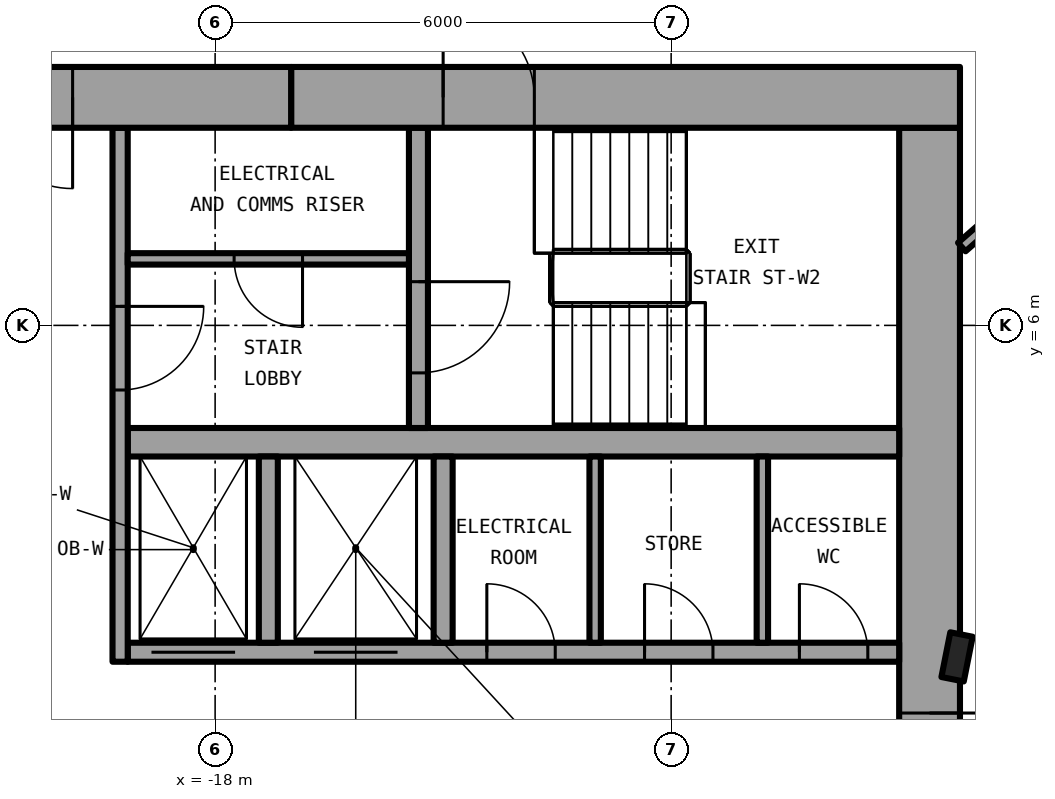
"""IFC4 building model, lengths in metres.
Left out: names, types, materials, properties, quantities, classifications, styles, units other than length and angle.
Written with IfcOpenShell. Run it as: python <this file> out.ifc"""

import sys

from ifc_helpers import new_model, si_unit, direction, frame, frame_2d, origin, origin_2d, place, context, subcontext, project, spatial, rectangle, i_section, extrude, element, fill, save


model = new_model("IFC4")
c1 = context("Model", 3, precision=1e-05, world=origin(), true_north=direction((0.0, 1.0)))
c2 = subcontext(c1, "Body", "Model", "MODEL_VIEW")
j1 = project(units=[si_unit("LENGTHUNIT", "METRE"), si_unit("PLANEANGLEUNIT", "RADIAN")], contexts=[c1])
p1 = place(None, origin())
s1 = spatial("IfcSite", under=j1, at=p1, CompositionType="ELEMENT")
p2 = place(p1, origin())
s2 = spatial("IfcBuilding", under=s1, at=p2, CompositionType="ELEMENT")
p3 = place(p2, origin())
s3 = spatial("IfcBuildingStorey", under=s2, at=p3, CompositionType="ELEMENT", Elevation=0.0)
p4 = place(p3, frame((-8.239, 1.639, -0.5), z_axis=(0.0, 0.0, 1.0), x_axis=(-0.980785280403, 0.195090322016, 0.0)))
e1 = element("IfcColumn", 1, at=p4, inside=s3, PredefinedType="COLUMN", context=c2, shape_type="SweptSolid", body=[
    extrude(i_section(OverallWidth=0.3, OverallDepth=0.6, WebThickness=0.015, FlangeThickness=0.03, FilletRadius=0.027, at=origin_2d()), origin(), (0.0, 0.0, 1.0), 5.9),
])
p5 = place(p3, frame((-8.6, 8.6, 0.0), z_axis=(0.0, 0.0, 1.0), x_axis=(0.0, -1.0, 0.0)))
e2 = element("IfcWall", 2, at=p5, inside=s3, PredefinedType="SHEAR", context=c2, shape_type="SweptSolid", body=[
    extrude(rectangle(XDim=17.2, YDim=0.8, at=frame_2d((8.6, 0.0))), origin(), (0.0, 0.0, 1.0), 5.4),
])
p6 = place(p5, frame((7.7, 0.0, 0.0)))
e3 = element("IfcOpeningElement", 3, at=p6, cuts=e2, PredefinedType="OPENING", context=c2, shape_type="SweptSolid", body=[
    extrude(rectangle(XDim=1.8, YDim=2.3, at=frame_2d((0.9, 1.15))), frame((0.0, 0.41, 0.0), z_axis=(0.0, -1.0, 0.0), x_axis=(1.0, 0.0, 0.0)), (0.0, 0.0, 1.0), 0.82),
])
p7 = place(p3, frame((-19.15, 1.7, 0.0), z_axis=(0.0, 0.0, 1.0), x_axis=(1.0, 0.0, 0.0)))
e4 = element("IfcWall", 4, at=p7, inside=s3, PredefinedType="SHEAR", context=c2, shape_type="SweptSolid", body=[
    extrude(rectangle(XDim=10.15, YDim=0.25, at=frame_2d((5.075, 0.0))), origin(), (0.0, 0.0, 1.0), 5.4),
])
p8 = place(p7, frame((2.45, 0.0, 0.0)))
e5 = element("IfcOpeningElement", 5, at=p8, cuts=e4, PredefinedType="OPENING", context=c2, shape_type="SweptSolid", body=[
    extrude(rectangle(XDim=1.1, YDim=2.3, at=frame_2d((0.55, 1.15))), frame((0.0, 0.135, 0.0), z_axis=(0.0, -1.0, 0.0), x_axis=(1.0, 0.0, 0.0)), (0.0, 0.0, 1.0), 0.27),
])
p9 = place(p7, frame((0.312, 0.0, 0.0)))
e6 = element("IfcOpeningElement", 6, at=p9, cuts=e4, PredefinedType="OPENING", context=c2, shape_type="SweptSolid", body=[
    extrude(rectangle(XDim=1.1, YDim=2.3, at=frame_2d((0.55, 1.15))), frame((0.0, 0.135, 0.0), z_axis=(0.0, -1.0, 0.0), x_axis=(1.0, 0.0, 0.0)), (0.0, 0.0, 1.0), 0.27),
])
p10 = place(p7, frame((8.837, 0.0, 0.0)))
e7 = element("IfcOpeningElement", 7, at=p10, cuts=e4, PredefinedType="OPENING", context=c2, shape_type="SweptSolid", body=[
    extrude(rectangle(XDim=0.9, YDim=2.3, at=frame_2d((0.45, 1.15))), frame((0.0, 0.135, 0.0), z_axis=(0.0, -1.0, 0.0), x_axis=(1.0, 0.0, 0.0)), (0.0, 0.0, 1.0), 0.27),
])
p11 = place(p7, frame((6.8, 0.0, 0.0)))
e8 = element("IfcOpeningElement", 8, at=p11, cuts=e4, PredefinedType="OPENING", context=c2, shape_type="SweptSolid", body=[
    extrude(rectangle(XDim=0.9, YDim=2.3, at=frame_2d((0.45, 1.15))), frame((0.0, 0.135, 0.0), z_axis=(0.0, -1.0, 0.0), x_axis=(1.0, 0.0, 0.0)), (0.0, 0.0, 1.0), 0.27),
])
p12 = place(p7, frame((4.725, 0.0, 0.0)))
e9 = element("IfcOpeningElement", 9, at=p12, cuts=e4, PredefinedType="OPENING", context=c2, shape_type="SweptSolid", body=[
    extrude(rectangle(XDim=0.9, YDim=2.3, at=frame_2d((0.45, 1.15))), frame((0.0, 0.135, 0.0), z_axis=(0.0, -1.0, 0.0), x_axis=(1.0, 0.0, 0.0)), (0.0, 0.0, 1.0), 0.27),
])
p13 = place(p3, frame((-9.0, 4.462, 0.0), z_axis=(0.0, 0.0, 1.0), x_axis=(-1.0, 0.0, 0.0)))
e10 = element("IfcWall", 10, at=p13, inside=s3, PredefinedType="SHEAR", context=c2, shape_type="SweptSolid", body=[
    extrude(rectangle(XDim=10.15, YDim=0.375, at=frame_2d((5.075, 0.0))), origin(), (0.0, 0.0, 1.0), 5.4),
])
p14 = place(p3, frame((-15.325, 8.6, 0.0), z_axis=(0.0, 0.0, 1.0), x_axis=(0.0, -1.0, 0.0)))
e11 = element("IfcWall", 11, at=p14, inside=s3, PredefinedType="SHEAR", context=c2, shape_type="SweptSolid", body=[
    extrude(rectangle(XDim=3.95, YDim=0.25, at=frame_2d((1.975, 0.0))), origin(), (0.0, 0.0, 1.0), 5.4),
])
p15 = place(p14, frame((2.025, 0.0, 0.0)))
e12 = element("IfcOpeningElement", 12, at=p15, cuts=e11, PredefinedType="OPENING", context=c2, shape_type="SweptSolid", body=[
    extrude(rectangle(XDim=1.2, YDim=2.3, at=frame_2d((0.6, 1.15))), frame((0.0, 0.135, 0.0), z_axis=(0.0, -1.0, 0.0), x_axis=(1.0, 0.0, 0.0)), (0.0, 0.0, 1.0), 0.27),
])
for number, where, z_axis, x_axis in (
    (13, (-15.0, 1.825, 0.0), (0.0, 0.0, 1.0), (0.0, 1.0, 0.0)),
    (14, (-17.3, 1.825, 0.0), (0.0, 0.0, 1.0), (0.0, 1.0, 0.0)),
):
    element("IfcWall", number, at=place(p3, frame(where, z_axis=z_axis, x_axis=x_axis)), inside=s3, PredefinedType="SOLIDWALL", context=c2, shape_type="SweptSolid", body=[
        extrude(rectangle(XDim=2.45, YDim=0.25, at=frame_2d((1.225, 0.0))), origin(), (0.0, 0.0, 1.0), 4.95),
    ])
p16 = place(p3, frame((-19.25, 8.6, 0.0), z_axis=(0.0, 0.0, 1.0), x_axis=(0.0, -1.0, 0.0)))
e15 = element("IfcWall", 15, at=p16, inside=s3, PredefinedType="SOLIDWALL", context=c2, shape_type="SweptSolid", body=[
    extrude(rectangle(XDim=7.025, YDim=0.2, at=frame_2d((3.513, 0.0))), origin(), (0.0, 0.0, 1.0), 4.95),
])
p17 = place(p16, frame((2.35, 0.0, 0.0)))
e16 = element("IfcOpeningElement", 16, at=p17, cuts=e15, PredefinedType="OPENING", context=c2, shape_type="SweptSolid", body=[
    extrude(rectangle(XDim=1.1, YDim=2.3, at=frame_2d((0.55, 1.15))), frame((0.0, 0.11, 0.0), z_axis=(0.0, -1.0, 0.0), x_axis=(1.0, 0.0, 0.0)), (0.0, 0.0, 1.0), 0.22),
])
for number, where, z_axis, x_axis in (
    (17, (-10.8, 1.825, 0.0), (0.0, 0.0, 1.0), (0.0, 1.0, 0.0)),
    (18, (-13.0, 1.825, 0.0), (0.0, 0.0, 1.0), (0.0, 1.0, 0.0)),
):
    element("IfcWall", number, at=place(p3, frame(where, z_axis=z_axis, x_axis=x_axis)), inside=s3, PredefinedType="PARTITIONING", context=c2, shape_type="SweptSolid", body=[
        extrude(rectangle(XDim=2.45, YDim=0.15, at=frame_2d((1.225, 0.0))), origin(), (0.0, 0.0, 1.0), 4.95),
    ])
p18 = place(p3, frame((-15.45, 6.875, 0.0), z_axis=(0.0, 0.0, 1.0), x_axis=(-1.0, 0.0, 0.0)))
e19 = element("IfcWall", 19, at=p18, inside=s3, PredefinedType="PARTITIONING", context=c2, shape_type="SweptSolid", body=[
    extrude(rectangle(XDim=3.7, YDim=0.15, at=frame_2d((1.85, 0.0))), origin(), (0.0, 0.0, 1.0), 4.95),
])
p19 = place(p18, frame((1.4, 0.0, 0.0)))
e20 = element("IfcOpeningElement", 20, at=p19, cuts=e19, PredefinedType="OPENING", context=c2, shape_type="SweptSolid", body=[
    extrude(rectangle(XDim=0.9, YDim=2.3, at=frame_2d((0.45, 1.15))), frame((0.0, 0.085, 0.0), z_axis=(0.0, -1.0, 0.0), x_axis=(1.0, 0.0, 0.0)), (0.0, 0.0, 1.0), 0.17),
])
p20 = place(p3, frame((-17.0, 9.0, 0.0), z_axis=(0.0, 0.0, 1.0), x_axis=(1.0, 0.0, 0.0)))
e21 = element("IfcWall", 21, at=p20, inside=s3, PredefinedType="SHEAR", context=c2, shape_type="SweptSolid", body=[
    extrude(rectangle(XDim=8.8, YDim=0.8, at=frame_2d((4.4, 0.0))), origin(), (0.0, 0.0, 1.0), 5.4),
])
p21 = place(p20, frame((2.0, 0.0, 0.0)))
e22 = element("IfcOpeningElement", 22, at=p21, cuts=e21, PredefinedType="OPENING", context=c2, shape_type="SweptSolid", body=[
    extrude(rectangle(XDim=1.2, YDim=2.3, at=frame_2d((0.6, 1.15))), frame((0.0, 0.41, 0.0), z_axis=(0.0, -1.0, 0.0), x_axis=(1.0, 0.0, 0.0)), (0.0, 0.0, 1.0), 0.82),
])
p22 = place(p3, frame((-17.0, 9.0, 0.0), z_axis=(0.0, 0.0, 1.0), x_axis=(-1.0, 0.0, 0.0)))
e23 = element("IfcWall", 23, at=p22, inside=s3, PredefinedType="SHEAR", context=c2, shape_type="SweptSolid", body=[
    extrude(rectangle(XDim=5.4, YDim=0.8, at=frame_2d((2.7, 0.0))), origin(), (0.0, 0.0, 1.0), 5.4),
])
p23 = place(p22, frame((2.875, 0.0, 0.0)))
e24 = element("IfcOpeningElement", 24, at=p23, cuts=e23, PredefinedType="OPENING", context=c2, shape_type="SweptSolid", body=[
    extrude(rectangle(XDim=1.2, YDim=2.3, at=frame_2d((0.6, 1.15))), frame((0.0, 0.41, 0.0), z_axis=(0.0, -1.0, 0.0), x_axis=(1.0, 0.0, 0.0)), (0.0, 0.0, 1.0), 0.82),
])
p24 = place(p3, frame((-8.176, 7.031, 0.0), z_axis=(0.0, 0.0, 1.0), x_axis=(0.751755271413, 0.659442197544, 0.0)))
e25 = element("IfcWall", 25, at=p24, inside=s3, PredefinedType="PARTITIONING", context=c2, shape_type="SweptSolid", body=[
    extrude(rectangle(XDim=2.211, YDim=0.15, at=frame_2d((1.105, 0.0))), origin(), (0.0, 0.0, 1.0), 4.95),
])
p25 = place(p8, origin())
e26 = element("IfcDoor", 26, at=p25, inside=s3, OperationType="DOUBLE_DOOR_SLIDING", PredefinedType="DOOR", context=c2, shape_type="SweptSolid", body=[
    extrude(rectangle(XDim=1.1, YDim=2.3, at=frame_2d((0.55, 1.15))), frame((0.0, 0.025, 0.0), z_axis=(0.0, -1.0, 0.0), x_axis=(1.0, 0.0, 0.0)), (0.0, 0.0, 1.0), 0.05),
])
fill(e5, e26)
p26 = place(p9, origin())
e27 = element("IfcDoor", 27, at=p26, inside=s3, OperationType="DOUBLE_DOOR_SLIDING", PredefinedType="DOOR", context=c2, shape_type="SweptSolid", body=[
    extrude(rectangle(XDim=1.1, YDim=2.3, at=frame_2d((0.55, 1.15))), frame((0.0, 0.025, 0.0), z_axis=(0.0, -1.0, 0.0), x_axis=(1.0, 0.0, 0.0)), (0.0, 0.0, 1.0), 0.05),
])
fill(e6, e27)
p27 = place(p10, origin())
e28 = element("IfcDoor", 28, at=p27, inside=s3, OperationType="SINGLE_SWING_LEFT", PredefinedType="DOOR", context=c2, shape_type="SweptSolid", body=[
    extrude(rectangle(XDim=0.9, YDim=2.3, at=frame_2d((0.45, 1.15))), frame((0.0, 0.025, 0.0), z_axis=(0.0, -1.0, 0.0), x_axis=(1.0, 0.0, 0.0)), (0.0, 0.0, 1.0), 0.05),
])
fill(e7, e28)
p28 = place(p11, origin())
e29 = element("IfcDoor", 29, at=p28, inside=s3, OperationType="SINGLE_SWING_LEFT", PredefinedType="DOOR", context=c2, shape_type="SweptSolid", body=[
    extrude(rectangle(XDim=0.9, YDim=2.3, at=frame_2d((0.45, 1.15))), frame((0.0, 0.025, 0.0), z_axis=(0.0, -1.0, 0.0), x_axis=(1.0, 0.0, 0.0)), (0.0, 0.0, 1.0), 0.05),
])
fill(e8, e29)
p29 = place(p12, origin())
e30 = element("IfcDoor", 30, at=p29, inside=s3, OperationType="SINGLE_SWING_LEFT", PredefinedType="DOOR", context=c2, shape_type="SweptSolid", body=[
    extrude(rectangle(XDim=0.9, YDim=2.3, at=frame_2d((0.45, 1.15))), frame((0.0, 0.025, 0.0), z_axis=(0.0, -1.0, 0.0), x_axis=(1.0, 0.0, 0.0)), (0.0, 0.0, 1.0), 0.05),
])
fill(e9, e30)
p30 = place(p19, origin())
e31 = element("IfcDoor", 31, at=p30, inside=s3, OperationType="SINGLE_SWING_LEFT", PredefinedType="DOOR", context=c2, shape_type="SweptSolid", body=[
    extrude(rectangle(XDim=0.9, YDim=2.3, at=frame_2d((0.45, 1.15))), frame((0.0, 0.025, 0.0), z_axis=(0.0, -1.0, 0.0), x_axis=(1.0, 0.0, 0.0)), (0.0, 0.0, 1.0), 0.05),
])
fill(e20, e31)
p31 = place(p15, origin())
e32 = element("IfcDoor", 32, at=p31, inside=s3, OperationType="SINGLE_SWING_LEFT", PredefinedType="DOOR", context=c2, shape_type="SweptSolid", body=[
    extrude(rectangle(XDim=1.2, YDim=2.3, at=frame_2d((0.6, 1.15))), frame((0.0, 0.025, 0.0), z_axis=(0.0, -1.0, 0.0), x_axis=(1.0, 0.0, 0.0)), (0.0, 0.0, 1.0), 0.05),
])
fill(e12, e32)
p32 = place(p17, origin())
e33 = element("IfcDoor", 33, at=p32, inside=s3, OperationType="SINGLE_SWING_RIGHT", PredefinedType="DOOR", context=c2, shape_type="SweptSolid", body=[
    extrude(rectangle(XDim=1.1, YDim=2.3, at=frame_2d((0.55, 1.15))), frame((0.0, 0.025, 0.0), z_axis=(0.0, -1.0, 0.0), x_axis=(1.0, 0.0, 0.0)), (0.0, 0.0, 1.0), 0.05),
])
fill(e16, e33)
p33 = place(p23, origin())
e34 = element("IfcDoor", 34, at=p33, inside=s3, OperationType="SINGLE_SWING_LEFT", PredefinedType="DOOR", context=c2, shape_type="SweptSolid", body=[
    extrude(rectangle(XDim=1.2, YDim=2.3, at=frame_2d((0.6, 1.15))), frame((0.0, 0.025, 0.0), z_axis=(0.0, -1.0, 0.0), x_axis=(1.0, 0.0, 0.0)), (0.0, 0.0, 1.0), 0.05),
])
fill(e24, e34)
p34 = place(p6, origin())
e35 = element("IfcDoor", 35, at=p34, inside=s3, OperationType="SINGLE_SWING_LEFT", PredefinedType="DOOR", context=c2, shape_type="SweptSolid", body=[
    extrude(rectangle(XDim=1.8, YDim=2.3, at=frame_2d((0.9, 1.15))), frame((0.0, 0.025, 0.0), z_axis=(0.0, -1.0, 0.0), x_axis=(1.0, 0.0, 0.0)), (0.0, 0.0, 1.0), 0.05),
])
fill(e3, e35)
p35 = place(p21, origin())
e36 = element("IfcDoor", 36, at=p35, inside=s3, OperationType="SINGLE_SWING_RIGHT", PredefinedType="DOOR", context=c2, shape_type="SweptSolid", body=[
    extrude(rectangle(XDim=1.2, YDim=2.3, at=frame_2d((0.6, 1.15))), frame((0.0, 0.025, 0.0), z_axis=(0.0, -1.0, 0.0), x_axis=(1.0, 0.0, 0.0)), (0.0, 0.0, 1.0), 0.05),
])
fill(e22, e36)
save(model, sys.argv[1])
